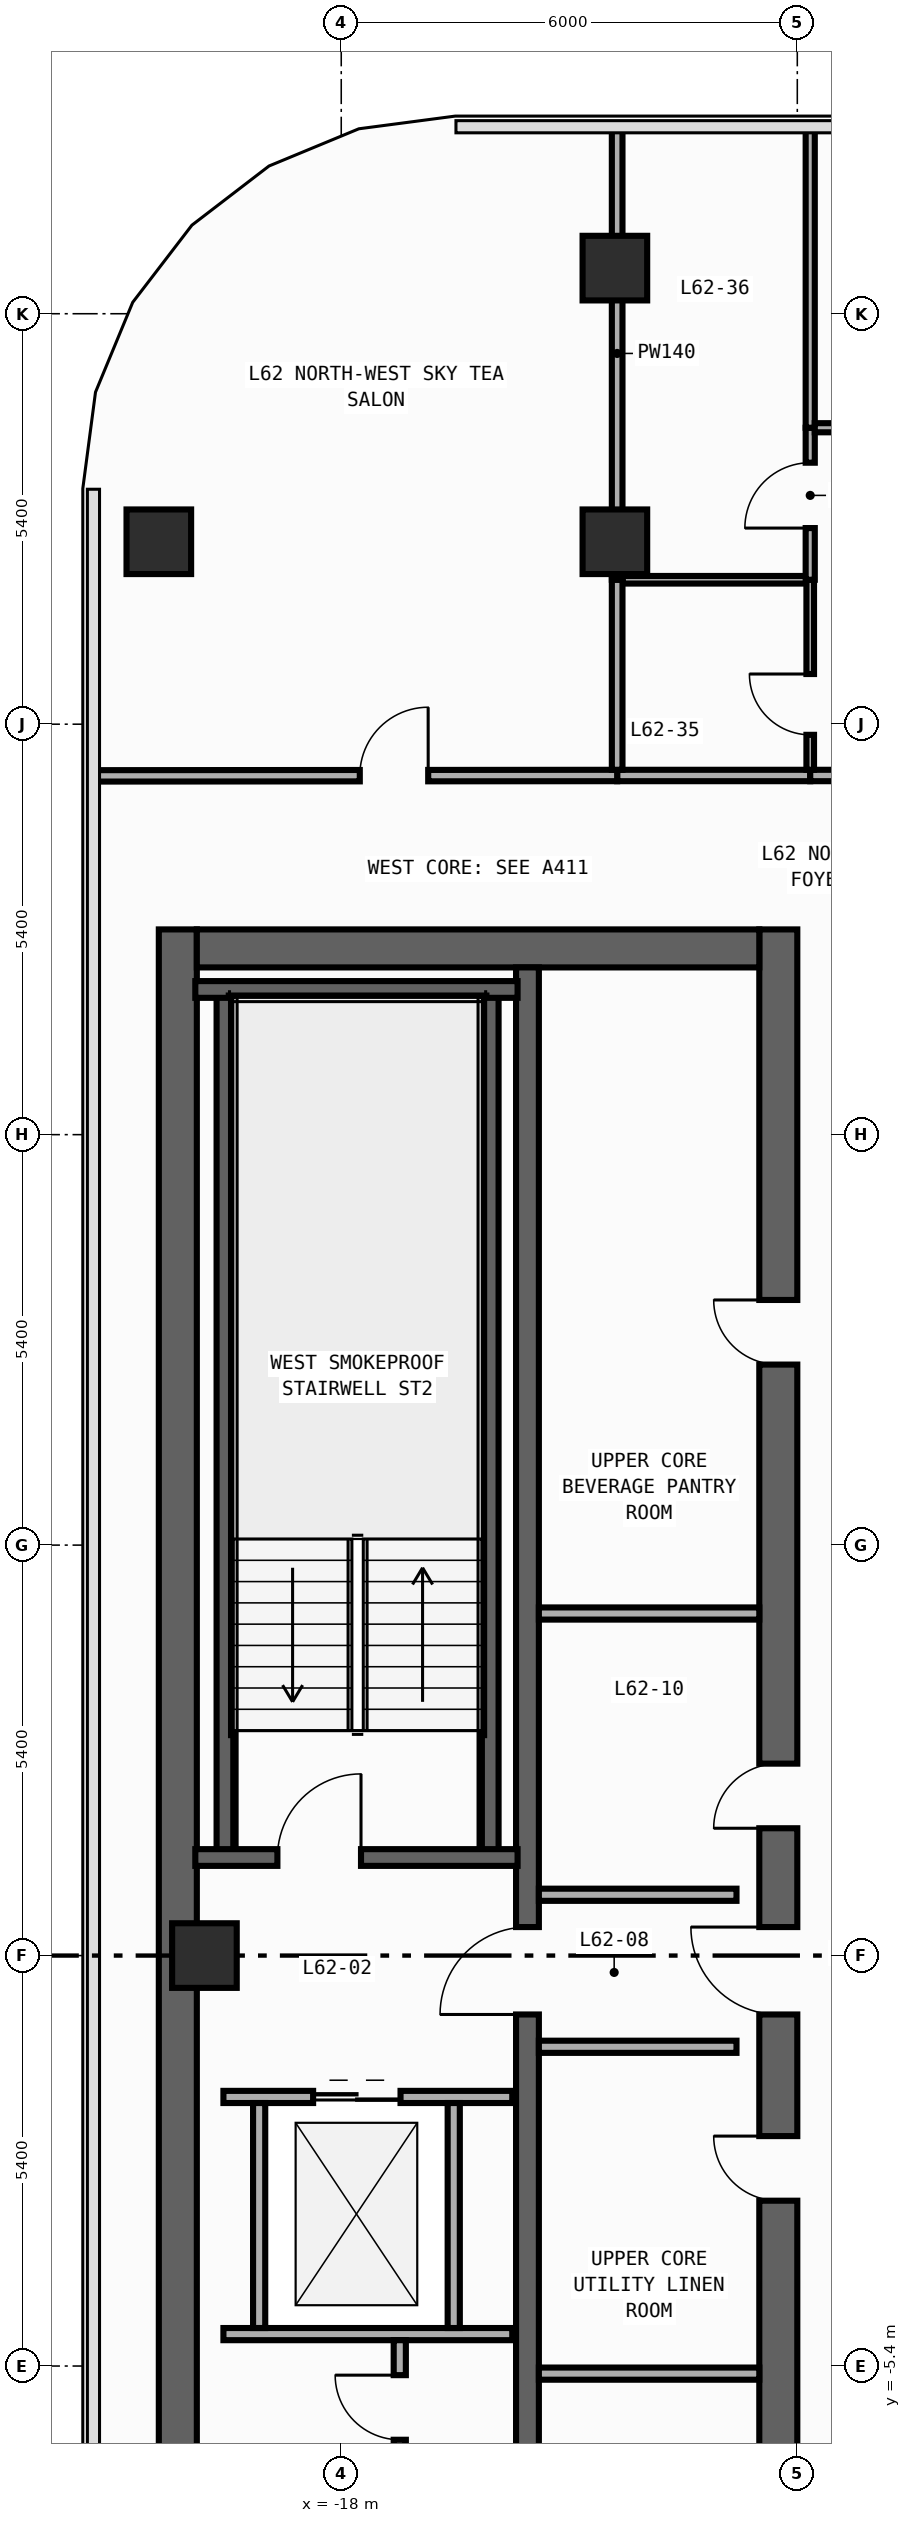
"""IFC4 building model, lengths in metres.
Left out: names, types, materials, properties, quantities, classifications, styles, units other than length and angle.
Written with IfcOpenShell. Run it as: python <this file> out.ifc"""

import sys

from ifc_helpers import new_model, si_unit, direction, frame, frame_2d, origin, origin_2d, place, context, subcontext, project, spatial, rectangle, extrude, element, fill, save


model = new_model("IFC4")
c1 = context("Model", 3, precision=1e-05, world=origin(), true_north=direction((0.0, 1.0)))
c2 = subcontext(c1, "Body", "Model", "MODEL_VIEW")
j1 = project(units=[si_unit("LENGTHUNIT", "METRE"), si_unit("PLANEANGLEUNIT", "RADIAN")], contexts=[c1])
p1 = place(None, origin())
s1 = spatial("IfcSite", under=j1, at=p1, CompositionType="ELEMENT")
p2 = place(p1, origin())
s2 = spatial("IfcBuilding", under=s1, at=p2, CompositionType="ELEMENT")
p3 = place(p2, frame((0.0, 0.0, 262.0)))
s3 = spatial("IfcBuildingStorey", under=s2, at=p3, CompositionType="ELEMENT", Elevation=262.0)
p4 = place(p3, frame((-20.15, -13.5, 0.0), z_axis=(0.0, 0.0, 1.0), x_axis=(0.0, 1.0, 0.0)))
e1 = element("IfcWall", 1, at=p4, inside=s3, PredefinedType="SHEAR", context=c2, shape_type="SweptSolid", body=[
    extrude(rectangle(XDim=27.0, YDim=0.5, at=frame_2d((13.5, 0.0))), origin(), (0.0, 0.0, 1.0), 3.34),
])
p5 = place(p3, frame((-12.25, -13.5, 0.0), z_axis=(0.0, 0.0, 1.0), x_axis=(0.0, 1.0, 0.0)))
e2 = element("IfcWall", 2, at=p5, inside=s3, PredefinedType="SHEAR", context=c2, shape_type="SweptSolid", body=[
    extrude(rectangle(XDim=27.0, YDim=0.5, at=frame_2d((13.5, 0.0))), origin(), (0.0, 0.0, 1.0), 3.34),
])
p6 = place(p5, frame((15.175, 0.0, 0.0)))
e3 = element("IfcOpeningElement", 3, at=p6, cuts=e2, PredefinedType="OPENING", context=c2, shape_type="SweptSolid", body=[
    extrude(rectangle(XDim=0.85, YDim=2.1, at=frame_2d((0.425, 1.05))), frame((0.0, 0.26, 0.0), z_axis=(0.0, -1.0, 0.0), x_axis=(1.0, 0.0, 0.0)), (0.0, 0.0, 1.0), 0.52),
])
p7 = place(p5, frame((21.275, 0.0, 0.0)))
e4 = element("IfcOpeningElement", 4, at=p7, cuts=e2, PredefinedType="OPENING", context=c2, shape_type="SweptSolid", body=[
    extrude(rectangle(XDim=0.85, YDim=2.1, at=frame_2d((0.425, 1.05))), frame((0.0, 0.26, 0.0), z_axis=(0.0, -1.0, 0.0), x_axis=(1.0, 0.0, 0.0)), (0.0, 0.0, 1.0), 0.52),
])
p8 = place(p5, frame((4.275, 0.0, 0.0)))
e5 = element("IfcOpeningElement", 5, at=p8, cuts=e2, PredefinedType="OPENING", context=c2, shape_type="SweptSolid", body=[
    extrude(rectangle(XDim=0.85, YDim=2.1, at=frame_2d((0.425, 1.05))), frame((0.0, 0.26, 0.0), z_axis=(0.0, -1.0, 0.0), x_axis=(1.0, 0.0, 0.0)), (0.0, 0.0, 1.0), 0.52),
])
p9 = place(p5, frame((10.275, 0.0, 0.0)))
e6 = element("IfcOpeningElement", 6, at=p9, cuts=e2, PredefinedType="OPENING", context=c2, shape_type="SweptSolid", body=[
    extrude(rectangle(XDim=0.85, YDim=2.1, at=frame_2d((0.425, 1.05))), frame((0.0, 0.26, 0.0), z_axis=(0.0, -1.0, 0.0), x_axis=(1.0, 0.0, 0.0)), (0.0, 0.0, 1.0), 0.52),
])
p10 = place(p5, frame((12.725, 0.0, 0.0)))
e7 = element("IfcOpeningElement", 7, at=p10, cuts=e2, PredefinedType="OPENING", context=c2, shape_type="SweptSolid", body=[
    extrude(rectangle(XDim=1.15, YDim=2.2, at=frame_2d((0.575, 1.1))), frame((0.0, 0.26, 0.0), z_axis=(0.0, -1.0, 0.0), x_axis=(1.0, 0.0, 0.0)), (0.0, 0.0, 1.0), 0.52),
])
p11 = place(p5, frame((1.625, 0.0, 0.0)))
e8 = element("IfcOpeningElement", 8, at=p11, cuts=e2, PredefinedType="OPENING", context=c2, shape_type="SweptSolid", body=[
    extrude(rectangle(XDim=0.85, YDim=2.1, at=frame_2d((0.425, 1.05))), frame((0.0, 0.26, 0.0), z_axis=(0.0, -1.0, 0.0), x_axis=(1.0, 0.0, 0.0)), (0.0, 0.0, 1.0), 0.52),
])
p12 = place(p3, frame((-19.9, 13.25, 0.0), z_axis=(0.0, 0.0, 1.0), x_axis=(1.0, 0.0, 0.0)))
e9 = element("IfcWall", 9, at=p12, inside=s3, PredefinedType="SHEAR", context=c2, shape_type="SweptSolid", body=[
    extrude(rectangle(XDim=7.4, YDim=0.5, at=frame_2d((3.7, 0.0))), origin(), (0.0, 0.0, 1.0), 3.34),
])
p13 = place(p3, frame((-15.55, -13.0, 0.0), z_axis=(0.0, 0.0, 1.0), x_axis=(0.0, 1.0, 0.0)))
e10 = element("IfcWall", 10, at=p13, inside=s3, PredefinedType="SHEAR", context=c2, shape_type="SweptSolid", body=[
    extrude(rectangle(XDim=26.0, YDim=0.3, at=frame_2d((13.0, 0.0))), origin(), (0.0, 0.0, 1.0), 3.34),
])
p14 = place(p13, frame((12.225, 0.0, 0.0)))
e11 = element("IfcOpeningElement", 11, at=p14, cuts=e10, PredefinedType="OPENING", context=c2, shape_type="SweptSolid", body=[
    extrude(rectangle(XDim=1.15, YDim=2.2, at=frame_2d((0.575, 1.1))), frame((0.0, 0.16, 0.0), z_axis=(0.0, -1.0, 0.0), x_axis=(1.0, 0.0, 0.0)), (0.0, 0.0, 1.0), 0.32),
])
p15 = place(p13, frame((1.125, 0.0, 0.0)))
e12 = element("IfcOpeningElement", 12, at=p15, cuts=e10, PredefinedType="OPENING", context=c2, shape_type="SweptSolid", body=[
    extrude(rectangle(XDim=0.85, YDim=2.1, at=frame_2d((0.425, 1.05))), frame((0.0, 0.16, 0.0), z_axis=(0.0, -1.0, 0.0), x_axis=(1.0, 0.0, 0.0)), (0.0, 0.0, 1.0), 0.32),
])
for number, where, z_axis, x_axis in (
    (13, (-16.04, 1.29, 0.0), (0.0, 0.0, 1.0), (0.0, 1.0, 0.0)),
    (14, (-19.53, 1.29, 0.0), (0.0, 0.0, 1.0), (0.0, 1.0, 0.0)),
):
    element("IfcWall", number, at=place(p3, frame(where, z_axis=z_axis, x_axis=x_axis)), inside=s3, PredefinedType="SHEAR", context=c2, shape_type="SweptSolid", body=[
        extrude(rectangle(XDim=11.42, YDim=0.22, at=frame_2d((5.71, 0.0))), origin(), (0.0, 0.0, 1.0), 3.34),
    ])
p16 = place(p3, frame((-19.92, 12.71, 0.0), z_axis=(0.0, 0.0, 1.0), x_axis=(1.0, 0.0, 0.0)))
e15 = element("IfcWall", 15, at=p16, inside=s3, PredefinedType="SHEAR", context=c2, shape_type="SweptSolid", body=[
    extrude(rectangle(XDim=4.24, YDim=0.22, at=frame_2d((2.12, 0.0))), origin(), (0.0, 0.0, 1.0), 3.34),
])
p17 = place(p3, frame((-19.92, 1.29, 0.0), z_axis=(0.0, 0.0, 1.0), x_axis=(1.0, 0.0, 0.0)))
e16 = element("IfcWall", 16, at=p17, inside=s3, PredefinedType="SHEAR", context=c2, shape_type="SweptSolid", body=[
    extrude(rectangle(XDim=4.24, YDim=0.22, at=frame_2d((2.12, 0.0))), origin(), (0.0, 0.0, 1.0), 3.34),
])
p18 = place(p17, frame((1.08, 0.0, 0.0)))
e17 = element("IfcOpeningElement", 17, at=p18, cuts=e16, PredefinedType="OPENING", context=c2, shape_type="SweptSolid", body=[
    extrude(rectangle(XDim=1.1, YDim=2.2, at=frame_2d((0.55, 1.1))), frame((0.0, 0.12, 0.0), z_axis=(0.0, -1.0, 0.0), x_axis=(1.0, 0.0, 0.0)), (0.0, 0.0, 1.0), 0.24),
])
for number, where, z_axis, x_axis in (
    (18, (-20.4, 18.6, 0.0), (0.0, 0.0, 1.0), (1.0, 0.0, 0.0)),
    (19, (-14.4, 18.6, 0.0), (0.0, 0.0, 1.0), (1.0, 0.0, 0.0)),
    (20, (-19.8, 0.0, 0.0), (0.0, 0.0, 1.0), (1.0, 0.0, 0.0)),
    (21, (-14.4, 22.2, 0.0), (0.0, 0.0, 1.0), (1.0, 0.0, 0.0)),
):
    element("IfcColumn", number, at=place(p3, frame(where, z_axis=z_axis, x_axis=x_axis)), inside=s3, PredefinedType="COLUMN", context=c2, shape_type="SweptSolid", body=[
        extrude(rectangle(XDim=0.85, YDim=0.85, at=origin_2d()), origin(), (0.0, 0.0, 1.0), 3.6),
    ])
p19 = place(p3, frame((-19.55, -1.86, 0.0), z_axis=(0.0, 0.0, 1.0), x_axis=(1.0, 0.0, 0.0)))
e22 = element("IfcWall", 22, at=p19, inside=s3, PredefinedType="STANDARD", context=c2, shape_type="SweptSolid", body=[
    extrude(rectangle(XDim=3.8, YDim=0.16, at=frame_2d((1.9, 0.0))), origin(), (0.0, 0.0, 1.0), 3.34),
])
p20 = place(p19, frame((1.18, 0.0, 0.0)))
e23 = element("IfcOpeningElement", 23, at=p20, cuts=e22, PredefinedType="OPENING", context=c2, shape_type="SweptSolid", body=[
    extrude(rectangle(XDim=1.15, YDim=2.2, at=frame_2d((0.575, 1.1))), frame((0.0, 0.09, 0.0), z_axis=(0.0, -1.0, 0.0), x_axis=(1.0, 0.0, 0.0)), (0.0, 0.0, 1.0), 0.18),
])
p21 = place(p3, frame((-19.55, -4.98, 0.0), z_axis=(0.0, 0.0, 1.0), x_axis=(1.0, 0.0, 0.0)))
e24 = element("IfcWall", 24, at=p21, inside=s3, PredefinedType="STANDARD", context=c2, shape_type="SweptSolid", body=[
    extrude(rectangle(XDim=3.8, YDim=0.16, at=frame_2d((1.9, 0.0))), origin(), (0.0, 0.0, 1.0), 3.34),
])
for number, where, z_axis, x_axis in (
    (25, (-19.08, -4.9, 0.0), (0.0, 0.0, 1.0), (0.0, 1.0, 0.0)),
    (26, (-16.52, -4.9, 0.0), (0.0, 0.0, 1.0), (0.0, 1.0, 0.0)),
):
    element("IfcWall", number, at=place(p3, frame(where, z_axis=z_axis, x_axis=x_axis)), inside=s3, PredefinedType="STANDARD", context=c2, shape_type="SweptSolid", body=[
        extrude(rectangle(XDim=2.96, YDim=0.16, at=frame_2d((1.48, 0.0))), origin(), (0.0, 0.0, 1.0), 3.34),
    ])
for number, where, z_axis, x_axis in (
    (27, (-15.4, 0.8, 0.0), (0.0, 0.0, 1.0), (1.0, 0.0, 0.0)),
    (28, (-15.4, -1.2, 0.0), (0.0, 0.0, 1.0), (1.0, 0.0, 0.0)),
):
    element("IfcWall", number, at=place(p3, frame(where, z_axis=z_axis, x_axis=x_axis)), inside=s3, PredefinedType="STANDARD", context=c2, shape_type="SweptSolid", body=[
        extrude(rectangle(XDim=2.6, YDim=0.16, at=frame_2d((1.3, 0.0))), origin(), (0.0, 0.0, 1.0), 3.34),
    ])
p22 = place(p3, frame((-17.23, -8.27, 0.0), z_axis=(0.0, 0.0, 1.0), x_axis=(0.0, 1.0, 0.0)))
e29 = element("IfcWall", 29, at=p22, inside=s3, PredefinedType="PARTITIONING", context=c2, shape_type="SweptSolid", body=[
    extrude(rectangle(XDim=3.21, YDim=0.16, at=frame_2d((1.605, 0.0))), origin(), (0.0, 0.0, 1.0), 3.34),
])
p23 = place(p22, frame((1.9, 0.0, 0.0)))
e30 = element("IfcOpeningElement", 30, at=p23, cuts=e29, PredefinedType="OPENING", context=c2, shape_type="SweptSolid", body=[
    extrude(rectangle(XDim=0.85, YDim=2.1, at=frame_2d((0.425, 1.05))), frame((0.0, 0.09, 0.0), z_axis=(0.0, -1.0, 0.0), x_axis=(1.0, 0.0, 0.0)), (0.0, 0.0, 1.0), 0.18),
])
for number, where, z_axis, x_axis in (
    (31, (-15.4, 4.5, 0.0), (0.0, 0.0, 1.0), (1.0, 0.0, 0.0)),
    (32, (-15.4, -5.5, 0.0), (0.0, 0.0, 1.0), (1.0, 0.0, 0.0)),
):
    element("IfcWall", number, at=place(p3, frame(where, z_axis=z_axis, x_axis=x_axis)), inside=s3, PredefinedType="PARTITIONING", context=c2, shape_type="SweptSolid", body=[
        extrude(rectangle(XDim=2.9, YDim=0.16, at=frame_2d((1.45, 0.0))), origin(), (0.0, 0.0, 1.0), 3.34),
    ])
p24 = place(p3, frame((-14.37, 15.525, 0.0), z_axis=(0.0, 0.0, 1.0), x_axis=(1.0, 0.0, 0.0)))
e33 = element("IfcWall", 33, at=p24, inside=s3, PredefinedType="PARTITIONING", context=c2, shape_type="SweptSolid", body=[
    extrude(rectangle(XDim=2.54, YDim=0.15, at=frame_2d((1.27, 0.0))), origin(), (0.0, 0.0, 1.0), 3.34),
])
p25 = place(p3, frame((-11.83, 15.525, 0.0), z_axis=(0.0, 0.0, 1.0), x_axis=(1.0, 0.0, 0.0)))
e34 = element("IfcWall", 34, at=p25, inside=s3, PredefinedType="PARTITIONING", context=c2, shape_type="SweptSolid", body=[
    extrude(rectangle(XDim=10.93, YDim=0.15, at=frame_2d((5.465, 0.0))), origin(), (0.0, 0.0, 1.0), 3.34),
])
p26 = place(p25, frame((4.306, 0.0, 0.0)))
e35 = element("IfcOpeningElement", 35, at=p26, cuts=e34, PredefinedType="OPENING", context=c2, shape_type="SweptSolid", body=[
    extrude(rectangle(XDim=0.9, YDim=2.15, at=frame_2d((0.45, 1.075))), frame((0.0, 0.085, 0.0), z_axis=(0.0, -1.0, 0.0), x_axis=(1.0, 0.0, 0.0)), (0.0, 0.0, 1.0), 0.17),
])
p27 = place(p3, frame((-21.255, 15.52, 0.0), z_axis=(0.0, 0.0, 1.0), x_axis=(0.999999748504, 0.00070921968, 0.0)))
e36 = element("IfcWall", 36, at=p27, inside=s3, PredefinedType="PARTITIONING", context=c2, shape_type="SweptSolid", body=[
    extrude(rectangle(XDim=6.885, YDim=0.15, at=frame_2d((3.442, 0.0))), origin(), (0.0, 0.0, 1.0), 3.34),
])
p28 = place(p27, frame((3.499, 0.0, 0.0)))
e37 = element("IfcOpeningElement", 37, at=p28, cuts=e36, PredefinedType="OPENING", context=c2, shape_type="SweptSolid", body=[
    extrude(rectangle(XDim=0.9, YDim=2.15, at=frame_2d((0.45, 1.075))), frame((0.0, 0.085, 0.0), z_axis=(0.0, -1.0, 0.0), x_axis=(1.0, 0.0, 0.0)), (0.0, 0.0, 1.0), 0.17),
])
p29 = place(p3, frame((-14.3, 18.1, 0.0), z_axis=(0.0, 0.0, 1.0), x_axis=(1.0, 0.0, 0.0)))
e38 = element("IfcWall", 38, at=p29, inside=s3, PredefinedType="PARTITIONING", context=c2, shape_type="SweptSolid", body=[
    extrude(rectangle(XDim=2.42, YDim=0.1, at=frame_2d((1.21, 0.0))), origin(), (0.0, 0.0, 1.0), 3.34),
])
p30 = place(p3, frame((-11.83, 15.6, 0.0), z_axis=(0.0, 0.0, 1.0), x_axis=(0.0, 1.0, 0.0)))
e39 = element("IfcWall", 39, at=p30, inside=s3, PredefinedType="PARTITIONING", context=c2, shape_type="SweptSolid", body=[
    extrude(rectangle(XDim=2.5, YDim=0.1, at=frame_2d((1.25, 0.0))), origin(), (0.0, 0.0, 1.0), 3.34),
])
p31 = place(p30, frame((0.46, 0.0, 0.0)))
e40 = element("IfcOpeningElement", 40, at=p31, cuts=e39, PredefinedType="OPENING", context=c2, shape_type="SweptSolid", body=[
    extrude(rectangle(XDim=0.8, YDim=2.1, at=frame_2d((0.4, 1.05))), frame((0.0, 0.06, 0.0), z_axis=(0.0, -1.0, 0.0), x_axis=(1.0, 0.0, 0.0)), (0.0, 0.0, 1.0), 0.12),
])
p32 = place(p3, frame((-14.37, 15.6, 0.0), z_axis=(0.0, 0.0, 1.0), x_axis=(0.0, 1.0, 0.0)))
e41 = element("IfcWall", 41, at=p32, inside=s3, PredefinedType="PARTITIONING", context=c2, shape_type="SweptSolid", body=[
    extrude(rectangle(XDim=2.5, YDim=0.14, at=frame_2d((1.25, 0.0))), origin(), (0.0, 0.0, 1.0), 2.44),
])
p33 = place(p3, frame((-11.83, 18.1, 0.0), z_axis=(0.0, 0.0, 1.0), x_axis=(0.0, 1.0, 0.0)))
e42 = element("IfcWall", 42, at=p33, inside=s3, PredefinedType="PARTITIONING", context=c2, shape_type="SweptSolid", body=[
    extrude(rectangle(XDim=2.0, YDim=0.12, at=frame_2d((1.0, 0.0))), origin(), (0.0, 0.0, 1.0), 3.34),
])
p34 = place(p33, frame((0.68, 0.0, 0.0)))
e43 = element("IfcOpeningElement", 43, at=p34, cuts=e42, PredefinedType="OPENING", context=c2, shape_type="SweptSolid", body=[
    extrude(rectangle(XDim=0.86, YDim=2.15, at=frame_2d((0.43, 1.075))), frame((0.0, 0.07, 0.0), z_axis=(0.0, -1.0, 0.0), x_axis=(1.0, 0.0, 0.0)), (0.0, 0.0, 1.0), 0.14),
])
p35 = place(p3, frame((-11.83, 20.1, 0.0), z_axis=(0.0, 0.0, 1.0), x_axis=(0.0, 1.0, 0.0)))
e44 = element("IfcWall", 44, at=p35, inside=s3, PredefinedType="PARTITIONING", context=c2, shape_type="SweptSolid", body=[
    extrude(rectangle(XDim=3.955, YDim=0.12, at=frame_2d((1.978, 0.0))), origin(), (0.0, 0.0, 1.0), 3.34),
])
p36 = place(p3, frame((-14.37, 18.1, 0.0), z_axis=(0.0, 0.0, 1.0), x_axis=(0.0, 1.0, 0.0)))
e45 = element("IfcWall", 45, at=p36, inside=s3, PredefinedType="PARTITIONING", context=c2, shape_type="SweptSolid", body=[
    extrude(rectangle(XDim=5.955, YDim=0.14, at=frame_2d((2.978, 0.0))), origin(), (0.0, 0.0, 1.0), 2.44),
])
p37 = place(p3, frame((-11.77, 20.1, 0.0), z_axis=(0.0, 0.0, 1.0), x_axis=(1.0, 0.0, 0.0)))
e46 = element("IfcWall", 46, at=p37, inside=s3, PredefinedType="PARTITIONING", context=c2, shape_type="SweptSolid", body=[
    extrude(rectangle(XDim=3.583, YDim=0.12, at=frame_2d((1.792, 0.0))), origin(), (0.0, 0.0, 1.0), 3.34),
])
p38 = place(p37, frame((0.46, 0.0, 0.0)))
e47 = element("IfcOpeningElement", 47, at=p38, cuts=e46, PredefinedType="OPENING", context=c2, shape_type="SweptSolid", body=[
    extrude(rectangle(XDim=0.86, YDim=2.15, at=frame_2d((0.43, 1.075))), frame((0.0, 0.07, 0.0), z_axis=(0.0, -1.0, 0.0), x_axis=(1.0, 0.0, 0.0)), (0.0, 0.0, 1.0), 0.14),
])
p39 = place(p18, origin())
e48 = element("IfcDoor", 48, at=p39, inside=s3, OperationType="SINGLE_SWING_RIGHT", PredefinedType="DOOR", context=c2, shape_type="SweptSolid", body=[
    extrude(rectangle(XDim=1.1, YDim=2.2, at=frame_2d((0.55, 1.1))), frame((0.0, 0.025, 0.0), z_axis=(0.0, -1.0, 0.0), x_axis=(1.0, 0.0, 0.0)), (0.0, 0.0, 1.0), 0.05),
])
fill(e17, e48)
p40 = place(p6, origin())
e49 = element("IfcDoor", 49, at=p40, inside=s3, OperationType="SINGLE_SWING_LEFT", PredefinedType="DOOR", context=c2, shape_type="SweptSolid", body=[
    extrude(rectangle(XDim=0.85, YDim=2.1, at=frame_2d((0.425, 1.05))), frame((0.0, 0.025, 0.0), z_axis=(0.0, -1.0, 0.0), x_axis=(1.0, 0.0, 0.0)), (0.0, 0.0, 1.0), 0.05),
])
fill(e3, e49)
p41 = place(p7, origin())
e50 = element("IfcDoor", 50, at=p41, inside=s3, OperationType="SINGLE_SWING_RIGHT", PredefinedType="DOOR", context=c2, shape_type="SweptSolid", body=[
    extrude(rectangle(XDim=0.85, YDim=2.1, at=frame_2d((0.425, 1.05))), frame((0.0, 0.025, 0.0), z_axis=(0.0, -1.0, 0.0), x_axis=(1.0, 0.0, 0.0)), (0.0, 0.0, 1.0), 0.05),
])
fill(e4, e50)
p42 = place(p9, origin())
e51 = element("IfcDoor", 51, at=p42, inside=s3, OperationType="SINGLE_SWING_RIGHT", PredefinedType="DOOR", context=c2, shape_type="SweptSolid", body=[
    extrude(rectangle(XDim=0.85, YDim=2.1, at=frame_2d((0.425, 1.05))), frame((0.0, 0.025, 0.0), z_axis=(0.0, -1.0, 0.0), x_axis=(1.0, 0.0, 0.0)), (0.0, 0.0, 1.0), 0.05),
])
fill(e6, e51)
p43 = place(p10, origin())
e52 = element("IfcDoor", 52, at=p43, inside=s3, OperationType="SINGLE_SWING_RIGHT", PredefinedType="DOOR", context=c2, shape_type="SweptSolid", body=[
    extrude(rectangle(XDim=1.15, YDim=2.2, at=frame_2d((0.575, 1.1))), frame((0.0, 0.025, 0.0), z_axis=(0.0, -1.0, 0.0), x_axis=(1.0, 0.0, 0.0)), (0.0, 0.0, 1.0), 0.05),
])
fill(e7, e52)
p44 = place(p14, origin())
e53 = element("IfcDoor", 53, at=p44, inside=s3, OperationType="SINGLE_SWING_LEFT", PredefinedType="DOOR", context=c2, shape_type="SweptSolid", body=[
    extrude(rectangle(XDim=1.15, YDim=2.2, at=frame_2d((0.575, 1.1))), frame((0.0, 0.025, 0.0), z_axis=(0.0, -1.0, 0.0), x_axis=(1.0, 0.0, 0.0)), (0.0, 0.0, 1.0), 0.05),
])
fill(e11, e53)
p45 = place(p20, origin())
e54 = element("IfcDoor", 54, at=p45, inside=s3, OperationType="DOUBLE_DOOR_SLIDING", PredefinedType="DOOR", context=c2, shape_type="SweptSolid", body=[
    extrude(rectangle(XDim=1.15, YDim=2.2, at=frame_2d((0.575, 1.1))), frame((0.0, 0.025, 0.0), z_axis=(0.0, -1.0, 0.0), x_axis=(1.0, 0.0, 0.0)), (0.0, 0.0, 1.0), 0.05),
])
fill(e23, e54)
p46 = place(p23, origin())
e55 = element("IfcDoor", 55, at=p46, inside=s3, OperationType="SINGLE_SWING_RIGHT", PredefinedType="DOOR", context=c2, shape_type="SweptSolid", body=[
    extrude(rectangle(XDim=0.85, YDim=2.1, at=frame_2d((0.425, 1.05))), frame((0.0, 0.025, 0.0), z_axis=(0.0, -1.0, 0.0), x_axis=(1.0, 0.0, 0.0)), (0.0, 0.0, 1.0), 0.05),
])
fill(e30, e55)
p47 = place(p28, origin())
e56 = element("IfcDoor", 56, at=p47, inside=s3, OperationType="SINGLE_SWING_RIGHT", PredefinedType="DOOR", context=c2, shape_type="SweptSolid", body=[
    extrude(rectangle(XDim=0.9, YDim=2.15, at=frame_2d((0.45, 1.075))), frame((0.0, 0.025, 0.0), z_axis=(0.0, -1.0, 0.0), x_axis=(1.0, 0.0, 0.0)), (0.0, 0.0, 1.0), 0.05),
])
fill(e37, e56)
p48 = place(p31, origin())
e57 = element("IfcDoor", 57, at=p48, inside=s3, OperationType="SINGLE_SWING_RIGHT", PredefinedType="DOOR", context=c2, shape_type="SweptSolid", body=[
    extrude(rectangle(XDim=0.8, YDim=2.1, at=frame_2d((0.4, 1.05))), frame((0.0, 0.025, 0.0), z_axis=(0.0, -1.0, 0.0), x_axis=(1.0, 0.0, 0.0)), (0.0, 0.0, 1.0), 0.05),
])
fill(e40, e57)
p49 = place(p34, origin())
e58 = element("IfcDoor", 58, at=p49, inside=s3, OperationType="SINGLE_SWING_LEFT", PredefinedType="DOOR", context=c2, shape_type="SweptSolid", body=[
    extrude(rectangle(XDim=0.86, YDim=2.15, at=frame_2d((0.43, 1.075))), frame((0.0, 0.025, 0.0), z_axis=(0.0, -1.0, 0.0), x_axis=(1.0, 0.0, 0.0)), (0.0, 0.0, 1.0), 0.05),
])
fill(e43, e58)
save(model, sys.argv[1])
